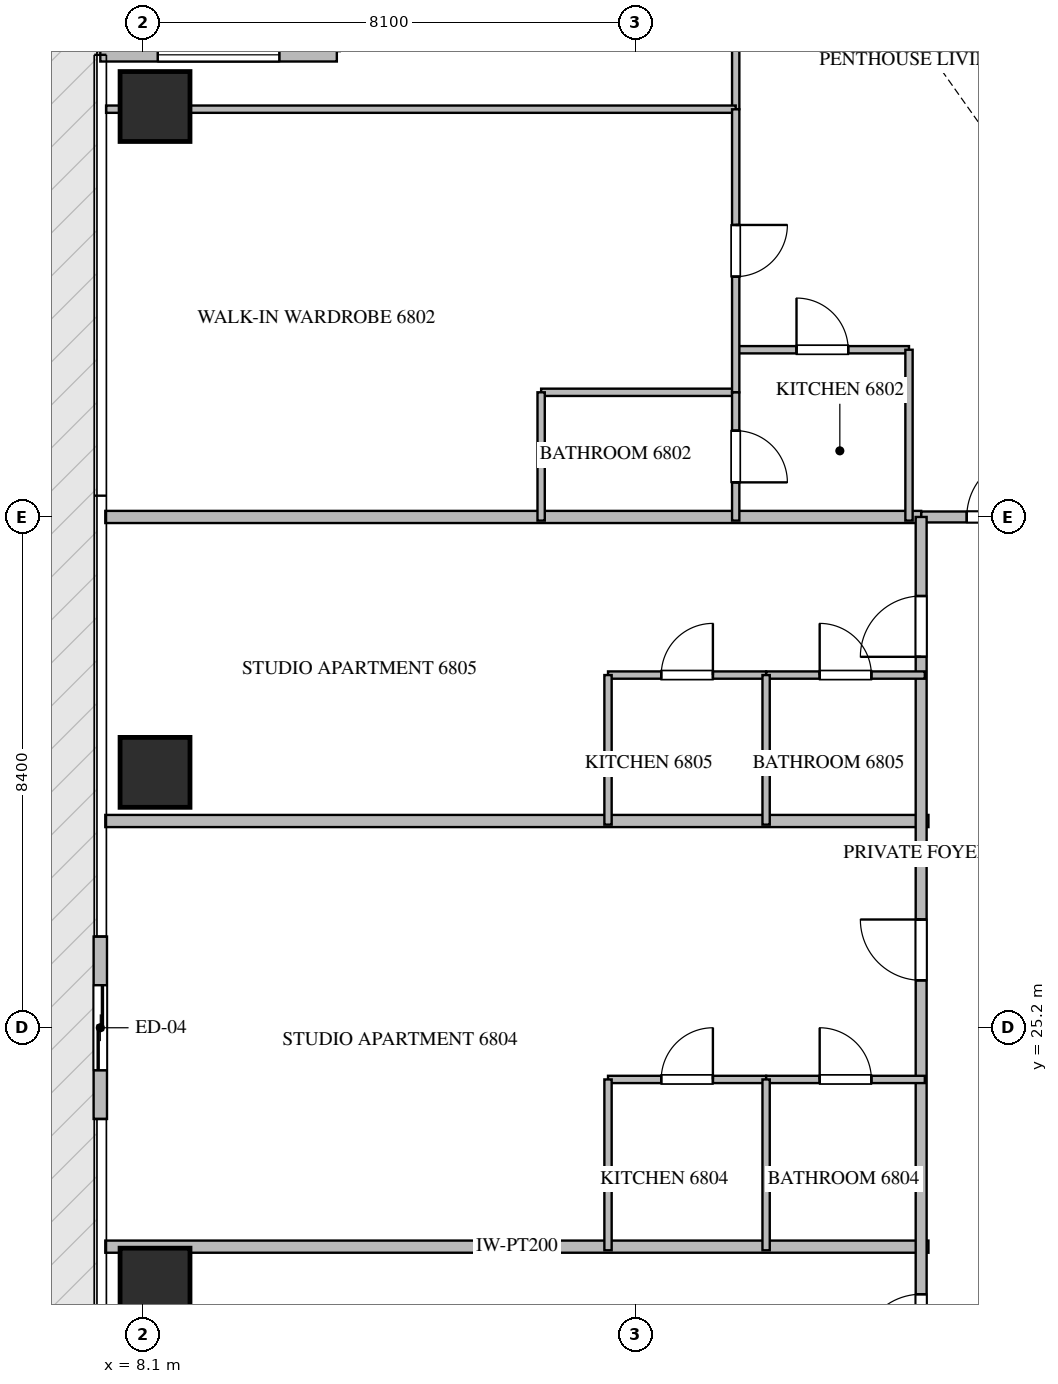
"""IFC4 building model, lengths in metres.
Left out: names, types, materials, properties, quantities, classifications, styles, units other than length and angle.
Written with IfcOpenShell. Run it as: python <this file> out.ifc"""

import sys

from ifc_helpers import new_model, si_unit, direction, frame, frame_2d, origin, origin_2d, place, context, subcontext, project, spatial, rectangle, extrude, source, transform, mapped, element, fill, save


model = new_model("IFC4")
c1 = context("Model", 3, precision=1e-05, world=origin(), true_north=direction((0.0, 1.0)))
c2 = subcontext(c1, "Body", "Model", "MODEL_VIEW")
j1 = project(units=[si_unit("LENGTHUNIT", "METRE"), si_unit("PLANEANGLEUNIT", "RADIAN")], contexts=[c1])
p1 = place(None, origin())
s1 = spatial("IfcSite", under=j1, at=p1, CompositionType="ELEMENT")
p2 = place(p1, origin())
s2 = spatial("IfcBuilding", under=s1, at=p2, CompositionType="ELEMENT")
p3 = place(p2, frame((0.0, 0.0, 272.05)))
s3 = spatial("IfcBuildingStorey", under=s2, at=p3, CompositionType="ELEMENT", Elevation=272.05)
m1 = source(origin(), c2, "Body", "SweptSolid", [
    extrude(rectangle(XDim=1.15, YDim=1.15, at=origin_2d()), origin(), (0.0, 0.0, 1.0), 3.85),
])
for number, where, z_axis, x_axis in (
    (1, (8.3, 21.0, -0.26), (0.0, 0.0, 1.0), (1.0, 0.0, 0.0)),
    (2, (8.3, 29.4, -0.26), (0.0, 0.0, 1.0), (1.0, 0.0, 0.0)),
    (3, (8.3, 40.35, -0.26), (0.0, 0.0, 1.0), (1.0, 0.0, 0.0)),
):
    element("IfcColumn", number, at=place(p3, frame(where, z_axis=z_axis, x_axis=x_axis)), inside=s3, PredefinedType="COLUMN", context=c2, shape_type="MappedRepresentation", body=[
        mapped(m1, transform((0.0, 0.0, 0.0), scale=1.0)),
    ])
p4 = place(p3, frame((11.29, 41.2, 0.0), z_axis=(0.0, 0.0, 1.0), x_axis=(-1.0, 0.0, 0.0)))
e4 = element("IfcWall", 4, at=p4, inside=s3, PredefinedType="ELEMENTEDWALL", context=c2, shape_type="SweptSolid", body=[
    extrude(rectangle(XDim=3.89, YDim=0.22, at=frame_2d((1.945, 0.0))), origin(), (0.0, 0.0, 1.0), 3.575),
])
p5 = place(p4, frame((0.945, 0.0, 0.65)))
e5 = element("IfcOpeningElement", 5, at=p5, cuts=e4, PredefinedType="OPENING", context=c2, shape_type="SweptSolid", body=[
    extrude(rectangle(XDim=2.0, YDim=2.2, at=frame_2d((1.0, 1.1))), frame((0.0, 0.12, 0.0), z_axis=(0.0, -1.0, 0.0), x_axis=(1.0, 0.0, 0.0)), (0.0, 0.0, 1.0), 0.24),
])
p6 = place(p3, frame((7.4, 26.7, 0.0), z_axis=(0.0, 0.0, 1.0), x_axis=(0.0, -1.0, 0.0)))
e6 = element("IfcWall", 6, at=p6, inside=s3, PredefinedType="ELEMENTEDWALL", context=c2, shape_type="SweptSolid", body=[
    extrude(rectangle(XDim=3.0, YDim=0.22, at=frame_2d((1.5, 0.0))), origin(), (0.0, 0.0, 1.0), 3.575),
])
p7 = place(p6, frame((0.8, 0.0, 0.0)))
e7 = element("IfcOpeningElement", 7, at=p7, cuts=e6, PredefinedType="OPENING", context=c2, shape_type="SweptSolid", body=[
    extrude(rectangle(XDim=1.4, YDim=2.25, at=frame_2d((0.7, 1.125))), frame((0.0, 0.12, 0.0), z_axis=(0.0, -1.0, 0.0), x_axis=(1.0, 0.0, 0.0)), (0.0, 0.0, 1.0), 0.24),
])
for number, where, z_axis, x_axis in (
    (8, (7.482, 21.6, 0.0), (0.0, 0.0, 1.0), (1.0, 0.0, 0.0)),
    (9, (7.482, 28.6, 0.0), (0.0, 0.0, 1.0), (1.0, 0.0, 0.0)),
):
    element("IfcWall", number, at=place(p3, frame(where, z_axis=z_axis, x_axis=x_axis)), inside=s3, PredefinedType="PARTITIONING", context=c2, shape_type="SweptSolid", body=[
        extrude(rectangle(XDim=13.538, YDim=0.2, at=frame_2d((6.769, 0.0))), origin(), (0.0, 0.0, 1.0), 3.59),
    ])
p8 = place(p3, frame((7.482, 33.6, 0.0), z_axis=(0.0, 0.0, 1.0), x_axis=(1.0, 0.0, 0.0)))
e10 = element("IfcWall", 10, at=p8, inside=s3, PredefinedType="PARTITIONING", context=c2, shape_type="SweptSolid", body=[
    extrude(rectangle(XDim=13.418, YDim=0.2, at=frame_2d((6.709, 0.0))), origin(), (0.0, 0.0, 1.0), 3.59),
])
p9 = place(p3, frame((20.902, 33.6, 0.0), z_axis=(0.0, 0.0, 1.0), x_axis=(1.0, 0.0, 0.0)))
e11 = element("IfcWall", 11, at=p9, inside=s3, PredefinedType="PARTITIONING", context=c2, shape_type="SweptSolid", body=[
    extrude(rectangle(XDim=2.496, YDim=0.18, at=frame_2d((1.248, 0.0))), origin(), (0.0, 0.0, 1.0), 3.59),
])
p10 = place(p9, frame((0.748, 0.0, 0.0)))
e12 = element("IfcOpeningElement", 12, at=p10, cuts=e11, PredefinedType="OPENING", context=c2, shape_type="SweptSolid", body=[
    extrude(rectangle(XDim=1.0, YDim=2.15, at=frame_2d((0.5, 1.075))), frame((0.0, 0.1, 0.0), z_axis=(0.0, -1.0, 0.0), x_axis=(1.0, 0.0, 0.0)), (0.0, 0.0, 1.0), 0.2),
])
p11 = place(p3, frame((20.9, 16.8, 0.0), z_axis=(0.0, 0.0, 1.0), x_axis=(0.0, 1.0, 0.0)))
e13 = element("IfcWall", 13, at=p11, inside=s3, PredefinedType="PARTITIONING", context=c2, shape_type="SweptSolid", body=[
    extrude(rectangle(XDim=16.8, YDim=0.18, at=frame_2d((8.4, 0.0))), origin(), (0.0, 0.0, 1.0), 3.59),
])
p12 = place(p11, frame((3.018, 0.0, 0.0)))
e14 = element("IfcOpeningElement", 14, at=p12, cuts=e13, PredefinedType="OPENING", context=c2, shape_type="SweptSolid", body=[
    extrude(rectangle(XDim=1.0, YDim=2.15, at=frame_2d((0.5, 1.075))), frame((0.0, 0.1, 0.0), z_axis=(0.0, -1.0, 0.0), x_axis=(1.0, 0.0, 0.0)), (0.0, 0.0, 1.0), 0.2),
])
p13 = place(p11, frame((9.18, 0.0, 0.0)))
e15 = element("IfcOpeningElement", 15, at=p13, cuts=e13, PredefinedType="OPENING", context=c2, shape_type="SweptSolid", body=[
    extrude(rectangle(XDim=1.0, YDim=2.15, at=frame_2d((0.5, 1.075))), frame((0.0, 0.1, 0.0), z_axis=(0.0, -1.0, 0.0), x_axis=(1.0, 0.0, 0.0)), (0.0, 0.0, 1.0), 0.2),
])
p14 = place(p11, frame((14.5, 0.0, 0.0)))
e16 = element("IfcOpeningElement", 16, at=p14, cuts=e13, PredefinedType="OPENING", context=c2, shape_type="SweptSolid", body=[
    extrude(rectangle(XDim=1.0, YDim=2.15, at=frame_2d((0.5, 1.075))), frame((0.0, 0.1, 0.0), z_axis=(0.0, -1.0, 0.0), x_axis=(1.0, 0.0, 0.0)), (0.0, 0.0, 1.0), 0.2),
])
p15 = place(p3, frame((17.85, 36.35, 0.0), z_axis=(0.0, 0.0, 1.0), x_axis=(1.0, 0.0, 0.0)))
e17 = element("IfcWall", 17, at=p15, inside=s3, PredefinedType="PARTITIONING", context=c2, shape_type="SweptSolid", body=[
    extrude(rectangle(XDim=2.85, YDim=0.12, at=frame_2d((1.425, 0.0))), origin(), (0.0, 0.0, 1.0), 3.59),
])
p16 = place(p15, frame((1.0, 0.0, 0.0)))
e18 = element("IfcOpeningElement", 18, at=p16, cuts=e17, PredefinedType="OPENING", context=c2, shape_type="SweptSolid", body=[
    extrude(rectangle(XDim=0.85, YDim=2.1, at=frame_2d((0.425, 1.05))), frame((0.0, 0.07, 0.0), z_axis=(0.0, -1.0, 0.0), x_axis=(1.0, 0.0, 0.0)), (0.0, 0.0, 1.0), 0.14),
])
p17 = place(p3, frame((20.7, 36.35, 0.0), z_axis=(0.0, 0.0, 1.0), x_axis=(0.0, -1.0, 0.0)))
e19 = element("IfcWall", 19, at=p17, inside=s3, PredefinedType="PARTITIONING", context=c2, shape_type="SweptSolid", body=[
    extrude(rectangle(XDim=2.81, YDim=0.12, at=frame_2d((1.405, 0.0))), origin(), (0.0, 0.0, 1.0), 3.59),
])
p18 = place(p3, frame((17.85, 49.105, 0.0), z_axis=(0.0, 0.0, 1.0), x_axis=(0.0, -1.0, 0.0)))
e20 = element("IfcWall", 20, at=p18, inside=s3, PredefinedType="PARTITIONING", context=c2, shape_type="SweptSolid", body=[
    extrude(rectangle(XDim=8.799, YDim=0.12, at=frame_2d((4.399, 0.0))), origin(), (0.0, 0.0, 1.0), 3.59),
])
p19 = place(p18, frame((4.344, 0.0, 0.0)))
e21 = element("IfcOpeningElement", 21, at=p19, cuts=e20, PredefinedType="OPENING", context=c2, shape_type="SweptSolid", body=[
    extrude(rectangle(XDim=0.9, YDim=2.1, at=frame_2d((0.45, 1.05))), frame((0.0, 0.07, 0.0), z_axis=(0.0, -1.0, 0.0), x_axis=(1.0, 0.0, 0.0)), (0.0, 0.0, 1.0), 0.14),
])
p20 = place(p3, frame((7.495, 40.306, 0.0), z_axis=(0.0, 0.0, 1.0), x_axis=(1.0, 0.0, 0.0)))
e22 = element("IfcWall", 22, at=p20, inside=s3, PredefinedType="PARTITIONING", context=c2, shape_type="SweptSolid", body=[
    extrude(rectangle(XDim=10.355, YDim=0.12, at=frame_2d((5.177, 0.0))), origin(), (0.0, 0.0, 1.0), 3.122),
])
p21 = place(p3, frame((14.65, 35.65, 0.0), z_axis=(0.0, 0.0, 1.0), x_axis=(1.0, 0.0, 0.0)))
e23 = element("IfcWall", 23, at=p21, inside=s3, PredefinedType="PARTITIONING", context=c2, shape_type="SweptSolid", body=[
    extrude(rectangle(XDim=3.2, YDim=0.12, at=frame_2d((1.6, 0.0))), origin(), (0.0, 0.0, 1.0), 3.59),
])
p22 = place(p3, frame((14.65, 35.65, 0.0), z_axis=(0.0, 0.0, 1.0), x_axis=(0.0, -1.0, 0.0)))
e24 = element("IfcWall", 24, at=p22, inside=s3, PredefinedType="PARTITIONING", context=c2, shape_type="SweptSolid", body=[
    extrude(rectangle(XDim=2.11, YDim=0.12, at=frame_2d((1.055, 0.0))), origin(), (0.0, 0.0, 1.0), 3.59),
])
p23 = place(p3, frame((17.85, 40.304, 0.0), z_axis=(0.0, 0.0, 1.0), x_axis=(0.0, -1.0, 0.0)))
e25 = element("IfcWall", 25, at=p23, inside=s3, PredefinedType="PARTITIONING", context=c2, shape_type="SweptSolid", body=[
    extrude(rectangle(XDim=4.654, YDim=0.12, at=frame_2d((2.327, 0.0))), origin(), (0.0, 0.0, 1.0), 3.59),
])
p24 = place(p23, frame((1.902, 0.0, 0.0)))
e26 = element("IfcOpeningElement", 26, at=p24, cuts=e25, PredefinedType="OPENING", context=c2, shape_type="SweptSolid", body=[
    extrude(rectangle(XDim=0.85, YDim=2.1, at=frame_2d((0.425, 1.05))), frame((0.0, 0.07, 0.0), z_axis=(0.0, -1.0, 0.0), x_axis=(1.0, 0.0, 0.0)), (0.0, 0.0, 1.0), 0.14),
])
p25 = place(p3, frame((17.85, 35.648, 0.0), z_axis=(0.0, 0.0, 1.0), x_axis=(0.0, -1.0, 0.0)))
e27 = element("IfcWall", 27, at=p25, inside=s3, PredefinedType="PARTITIONING", context=c2, shape_type="SweptSolid", body=[
    extrude(rectangle(XDim=2.108, YDim=0.12, at=frame_2d((1.054, 0.0))), origin(), (0.0, 0.0, 1.0), 3.59),
])
p26 = place(p25, frame((0.629, 0.0, 0.0)))
e28 = element("IfcOpeningElement", 28, at=p26, cuts=e27, PredefinedType="OPENING", context=c2, shape_type="SweptSolid", body=[
    extrude(rectangle(XDim=0.85, YDim=2.1, at=frame_2d((0.425, 1.05))), frame((0.0, 0.07, 0.0), z_axis=(0.0, -1.0, 0.0), x_axis=(1.0, 0.0, 0.0)), (0.0, 0.0, 1.0), 0.14),
])
p27 = place(p3, frame((15.75, 24.35, 0.0), z_axis=(0.0, 0.0, 1.0), x_axis=(1.0, 0.0, 0.0)))
e29 = element("IfcWall", 29, at=p27, inside=s3, PredefinedType="PARTITIONING", context=c2, shape_type="SweptSolid", body=[
    extrude(rectangle(XDim=2.6, YDim=0.12, at=frame_2d((1.3, 0.0))), origin(), (0.0, 0.0, 1.0), 3.59),
])
p28 = place(p27, frame((0.875, 0.0, 0.0)))
e30 = element("IfcOpeningElement", 30, at=p28, cuts=e29, PredefinedType="OPENING", context=c2, shape_type="SweptSolid", body=[
    extrude(rectangle(XDim=0.85, YDim=2.1, at=frame_2d((0.425, 1.05))), frame((0.0, 0.07, 0.0), z_axis=(0.0, -1.0, 0.0), x_axis=(1.0, 0.0, 0.0)), (0.0, 0.0, 1.0), 0.14),
])
p29 = place(p3, frame((18.352, 24.35, 0.0), z_axis=(0.0, 0.0, 1.0), x_axis=(1.0, 0.0, 0.0)))
e31 = element("IfcWall", 31, at=p29, inside=s3, PredefinedType="PARTITIONING", context=c2, shape_type="SweptSolid", body=[
    extrude(rectangle(XDim=2.608, YDim=0.12, at=frame_2d((1.304, 0.0))), origin(), (0.0, 0.0, 1.0), 3.59),
])
p30 = place(p29, frame((0.879, 0.0, 0.0)))
e32 = element("IfcOpeningElement", 32, at=p30, cuts=e31, PredefinedType="OPENING", context=c2, shape_type="SweptSolid", body=[
    extrude(rectangle(XDim=0.85, YDim=2.1, at=frame_2d((0.425, 1.05))), frame((0.0, 0.07, 0.0), z_axis=(0.0, -1.0, 0.0), x_axis=(1.0, 0.0, 0.0)), (0.0, 0.0, 1.0), 0.14),
])
for number, where, z_axis, x_axis in (
    (33, (18.35, 21.54, 0.0), (0.0, 0.0, 1.0), (0.0, 1.0, 0.0)),
    (34, (15.75, 21.54, 0.0), (0.0, 0.0, 1.0), (0.0, 1.0, 0.0)),
):
    element("IfcWall", number, at=place(p3, frame(where, z_axis=z_axis, x_axis=x_axis)), inside=s3, PredefinedType="PARTITIONING", context=c2, shape_type="SweptSolid", body=[
        extrude(rectangle(XDim=2.81, YDim=0.12, at=frame_2d((1.405, 0.0))), origin(), (0.0, 0.0, 1.0), 3.59),
    ])
p31 = place(p3, frame((15.75, 31.0, 0.0), z_axis=(0.0, 0.0, 1.0), x_axis=(1.0, 0.0, 0.0)))
e35 = element("IfcWall", 35, at=p31, inside=s3, PredefinedType="PARTITIONING", context=c2, shape_type="SweptSolid", body=[
    extrude(rectangle(XDim=2.6, YDim=0.12, at=frame_2d((1.3, 0.0))), origin(), (0.0, 0.0, 1.0), 3.59),
])
p32 = place(p31, frame((0.875, 0.0, 0.0)))
e36 = element("IfcOpeningElement", 36, at=p32, cuts=e35, PredefinedType="OPENING", context=c2, shape_type="SweptSolid", body=[
    extrude(rectangle(XDim=0.85, YDim=2.1, at=frame_2d((0.425, 1.05))), frame((0.0, 0.07, 0.0), z_axis=(0.0, -1.0, 0.0), x_axis=(1.0, 0.0, 0.0)), (0.0, 0.0, 1.0), 0.14),
])
p33 = place(p3, frame((18.352, 31.0, 0.0), z_axis=(0.0, 0.0, 1.0), x_axis=(1.0, 0.0, 0.0)))
e37 = element("IfcWall", 37, at=p33, inside=s3, PredefinedType="PARTITIONING", context=c2, shape_type="SweptSolid", body=[
    extrude(rectangle(XDim=2.608, YDim=0.12, at=frame_2d((1.304, 0.0))), origin(), (0.0, 0.0, 1.0), 3.59),
])
p34 = place(p33, frame((0.879, 0.0, 0.0)))
e38 = element("IfcOpeningElement", 38, at=p34, cuts=e37, PredefinedType="OPENING", context=c2, shape_type="SweptSolid", body=[
    extrude(rectangle(XDim=0.85, YDim=2.1, at=frame_2d((0.425, 1.05))), frame((0.0, 0.07, 0.0), z_axis=(0.0, -1.0, 0.0), x_axis=(1.0, 0.0, 0.0)), (0.0, 0.0, 1.0), 0.14),
])
for number, where, z_axis, x_axis in (
    (39, (18.35, 28.54, 0.0), (0.0, 0.0, 1.0), (0.0, 1.0, 0.0)),
    (40, (15.75, 28.54, 0.0), (0.0, 0.0, 1.0), (0.0, 1.0, 0.0)),
):
    element("IfcWall", number, at=place(p3, frame(where, z_axis=z_axis, x_axis=x_axis)), inside=s3, PredefinedType="PARTITIONING", context=c2, shape_type="SweptSolid", body=[
        extrude(rectangle(XDim=2.46, YDim=0.12, at=frame_2d((1.23, 0.0))), origin(), (0.0, 0.0, 1.0), 3.59),
    ])
m2 = source(origin(), c2, "Body", "SweptSolid", [
    extrude(rectangle(XDim=2.0, YDim=2.2, at=frame_2d((1.0, 1.1))), frame((0.0, 0.03, 0.0), z_axis=(0.0, -1.0, 0.0), x_axis=(1.0, 0.0, 0.0)), (0.0, 0.0, 1.0), 0.06),
])
p35 = place(p5, origin())
e41 = element("IfcWindow", 41, at=p35, inside=s3, PartitioningType="SINGLE_PANEL", PredefinedType="WINDOW", context=c2, shape_type="MappedRepresentation", body=[
    mapped(m2, transform((0.0, 0.0, 0.0), scale=1.0)),
])
fill(e5, e41)
m3 = source(origin(), c2, "Body", "SweptSolid", [
    extrude(rectangle(XDim=1.4, YDim=2.25, at=frame_2d((0.7, 1.125))), frame((0.0, 0.025, 0.0), z_axis=(0.0, -1.0, 0.0), x_axis=(1.0, 0.0, 0.0)), (0.0, 0.0, 1.0), 0.05),
])
p36 = place(p7, origin())
e42 = element("IfcDoor", 42, at=p36, inside=s3, OperationType="SLIDING_TO_LEFT", PredefinedType="DOOR", context=c2, shape_type="MappedRepresentation", body=[
    mapped(m3, transform((0.0, 0.0, 0.0), scale=1.0)),
])
fill(e7, e42)
m4 = source(origin(), c2, "Body", "SweptSolid", [
    extrude(rectangle(XDim=1.0, YDim=2.15, at=frame_2d((0.5, 1.075))), frame((0.0, 0.025, 0.0), z_axis=(0.0, -1.0, 0.0), x_axis=(1.0, 0.0, 0.0)), (0.0, 0.0, 1.0), 0.05),
])
p37 = place(p10, origin())
e43 = element("IfcDoor", 43, at=p37, inside=s3, OperationType="SINGLE_SWING_RIGHT", PredefinedType="DOOR", context=c2, shape_type="MappedRepresentation", body=[
    mapped(m4, transform((0.0, 0.0, 0.0), scale=1.0)),
])
fill(e12, e43)
p38 = place(p12, origin())
e44 = element("IfcDoor", 44, at=p38, inside=s3, OperationType="SINGLE_SWING_LEFT", PredefinedType="DOOR", context=c2, shape_type="MappedRepresentation", body=[
    mapped(m4, transform((0.0, 0.0, 0.0), scale=1.0)),
])
fill(e14, e44)
p39 = place(p13, origin())
e45 = element("IfcDoor", 45, at=p39, inside=s3, OperationType="SINGLE_SWING_RIGHT", PredefinedType="DOOR", context=c2, shape_type="MappedRepresentation", body=[
    mapped(m4, transform((0.0, 0.0, 0.0), scale=1.0)),
])
fill(e15, e45)
p40 = place(p14, origin())
e46 = element("IfcDoor", 46, at=p40, inside=s3, OperationType="SINGLE_SWING_LEFT", PredefinedType="DOOR", context=c2, shape_type="MappedRepresentation", body=[
    mapped(m4, transform((0.0, 0.0, 0.0), scale=1.0)),
])
fill(e16, e46)
m5 = source(origin(), c2, "Body", "SweptSolid", [
    extrude(rectangle(XDim=0.85, YDim=2.1, at=frame_2d((0.425, 1.05))), frame((0.0, 0.025, 0.0), z_axis=(0.0, -1.0, 0.0), x_axis=(1.0, 0.0, 0.0)), (0.0, 0.0, 1.0), 0.05),
])
p41 = place(p16, origin())
e47 = element("IfcDoor", 47, at=p41, inside=s3, OperationType="SINGLE_SWING_LEFT", PredefinedType="DOOR", context=c2, shape_type="MappedRepresentation", body=[
    mapped(m5, transform((0.0, 0.0, 0.0), scale=1.0)),
])
fill(e18, e47)
p42 = place(p24, origin())
e48 = element("IfcDoor", 48, at=p42, inside=s3, OperationType="SINGLE_SWING_LEFT", PredefinedType="DOOR", context=c2, shape_type="MappedRepresentation", body=[
    mapped(m5, transform((0.0, 0.0, 0.0), scale=1.0)),
])
fill(e26, e48)
p43 = place(p26, origin())
e49 = element("IfcDoor", 49, at=p43, inside=s3, OperationType="SINGLE_SWING_RIGHT", PredefinedType="DOOR", context=c2, shape_type="MappedRepresentation", body=[
    mapped(m5, transform((0.0, 0.0, 0.0), scale=1.0)),
])
fill(e28, e49)
p44 = place(p28, origin())
e50 = element("IfcDoor", 50, at=p44, inside=s3, OperationType="SINGLE_SWING_RIGHT", PredefinedType="DOOR", context=c2, shape_type="MappedRepresentation", body=[
    mapped(m5, transform((0.0, 0.0, 0.0), scale=1.0)),
])
fill(e30, e50)
p45 = place(p30, origin())
e51 = element("IfcDoor", 51, at=p45, inside=s3, OperationType="SINGLE_SWING_LEFT", PredefinedType="DOOR", context=c2, shape_type="MappedRepresentation", body=[
    mapped(m5, transform((0.0, 0.0, 0.0), scale=1.0)),
])
fill(e32, e51)
p46 = place(p32, origin())
e52 = element("IfcDoor", 52, at=p46, inside=s3, OperationType="SINGLE_SWING_RIGHT", PredefinedType="DOOR", context=c2, shape_type="MappedRepresentation", body=[
    mapped(m5, transform((0.0, 0.0, 0.0), scale=1.0)),
])
fill(e36, e52)
p47 = place(p34, origin())
e53 = element("IfcDoor", 53, at=p47, inside=s3, OperationType="SINGLE_SWING_LEFT", PredefinedType="DOOR", context=c2, shape_type="MappedRepresentation", body=[
    mapped(m5, transform((0.0, 0.0, 0.0), scale=1.0)),
])
fill(e38, e53)
save(model, sys.argv[1])
